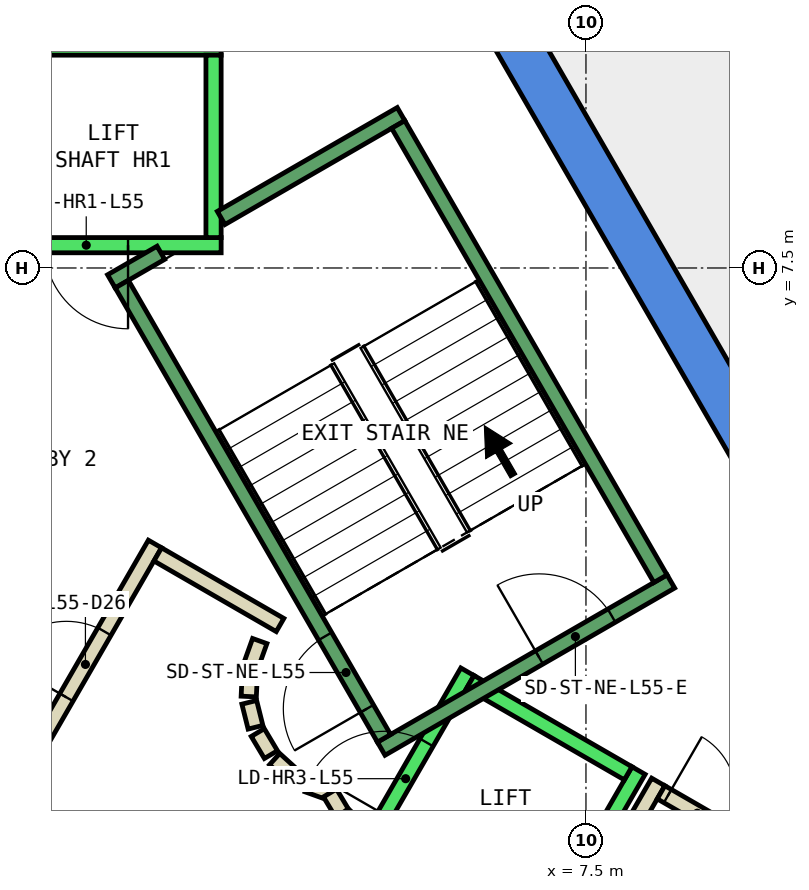
"""IFC4 building model, lengths in metres.
Left out: names, types, materials, properties, quantities, classifications, styles, units other than length and angle.
Written with IfcOpenShell. Run it as: python <this file> out.ifc"""

import sys

from ifc_helpers import new_model, si_unit, direction, frame, frame_2d, origin, place, context, subcontext, project, spatial, polyline, rectangle, outline, extrude, element, fill, save


model = new_model("IFC4")
c1 = context("Model", 3, precision=1e-05, world=origin(), true_north=direction((0.0, 1.0)))
c2 = subcontext(c1, "Body", "Model", "MODEL_VIEW")
j1 = project(units=[si_unit("LENGTHUNIT", "METRE"), si_unit("PLANEANGLEUNIT", "RADIAN")], contexts=[c1])
p1 = place(None, origin())
s1 = spatial("IfcSite", under=j1, at=p1, CompositionType="ELEMENT")
p2 = place(p1, origin())
s2 = spatial("IfcBuilding", under=s1, at=p2, CompositionType="ELEMENT")
p3 = place(p2, frame((0.0, 0.0, 245.0)))
s3 = spatial("IfcBuildingStorey", under=s2, at=p3, CompositionType="ELEMENT", Elevation=245.0)
p4 = place(p3, frame((0.0, 0.0, -0.34)))
e1 = element("IfcWall", 1, at=p4, inside=s3, PredefinedType="SHEAR", context=c2, shape_type="SweptSolid", body=[
    extrude(outline(polyline([(6.786, 10.747), (6.266, 10.447), (10.854, 2.5), (11.547, 2.5), (6.786, 10.747)])), origin(), (0.0, 0.0, 1.0), 3.6),
])
p5 = place(p3, frame((0.0, 0.0, -0.34)))
e2 = element("IfcWall", 2, at=p5, inside=s3, PredefinedType="SHEAR", context=c2, shape_type="SweptSolid", body=[
    extrude(outline(polyline([(5.774, -7.5), (11.547, 2.5), (10.854, 2.5), (5.427, -6.9), (5.774, -7.5)])), origin(), (0.0, 0.0, 1.0), 3.6),
])
p6 = place(p3, frame((8.939, 12.559, 0.0), z_axis=(0.0, 0.0, 1.0), x_axis=(0.517045022441, -0.855958202699, 0.0)))
e3 = element("IfcWall", 3, at=p6, inside=s3, PredefinedType="PARTITIONING", context=c2, shape_type="SweptSolid", body=[
    extrude(rectangle(XDim=3.166, YDim=0.2, at=frame_2d((1.583, 0.0))), origin(), (0.0, 0.0, 1.0), 3.26),
])
p7 = place(p6, frame((1.083, 0.0, 0.0)))
e4 = element("IfcOpeningElement", 4, at=p7, cuts=e3, PredefinedType="OPENING", context=c2, shape_type="SweptSolid", body=[
    extrude(rectangle(XDim=1.0, YDim=2.1, at=frame_2d((0.5, 1.05))), frame((0.0, 0.11, 0.0), z_axis=(0.0, -1.0, 0.0), x_axis=(1.0, 0.0, 0.0)), (0.0, 0.0, 1.0), 0.22),
])
p8 = place(p3, frame((5.751, -3.938, 0.0), z_axis=(0.0, 0.0, 1.0), x_axis=(0.500034260056, 0.866005622828, 0.0)))
e5 = element("IfcWall", 5, at=p8, inside=s3, PredefinedType="PARTITIONING", context=c2, shape_type="SweptSolid", body=[
    extrude(rectangle(XDim=5.399, YDim=0.2, at=frame_2d((2.7, 0.0))), origin(), (0.0, 0.0, 1.0), 3.26),
])
p9 = place(p3, frame((8.488, 0.602, 0.0), z_axis=(0.0, 0.0, 1.0), x_axis=(0.866063652425, -0.499933745558, 0.0)))
e6 = element("IfcWall", 6, at=p9, inside=s3, PredefinedType="PARTITIONING", context=c2, shape_type="SweptSolid", body=[
    extrude(rectangle(XDim=1.1, YDim=0.2, at=frame_2d((0.55, 0.0))), origin(), (0.0, 0.0, 1.0), 3.26),
])
p10 = place(p9, frame((0.1, 0.0, 0.0)))
e7 = element("IfcOpeningElement", 7, at=p10, cuts=e6, PredefinedType="OPENING", context=c2, shape_type="SweptSolid", body=[
    extrude(rectangle(XDim=0.9, YDim=2.1, at=frame_2d((0.45, 1.05))), frame((0.0, 0.11, 0.0), z_axis=(0.0, -1.0, 0.0), x_axis=(1.0, 0.0, 0.0)), (0.0, 0.0, 1.0), 0.22),
])
p11 = place(p3, frame((9.358, -4.692, 0.0), z_axis=(0.0, 0.0, 1.0), x_axis=(0.500027777314, 0.866009365951, 0.0)))
e8 = element("IfcWall", 8, at=p11, inside=s3, PredefinedType="PARTITIONING", context=c2, shape_type="SweptSolid", body=[
    extrude(rectangle(XDim=7.36, YDim=0.15, at=frame_2d((3.68, 0.0))), origin(), (0.0, 0.0, 1.0), 3.26),
])
p12 = place(p3, frame((0.05, 0.787, 0.0), z_axis=(0.0, 0.0, 1.0), x_axis=(0.499954076797, 0.866051915934, 0.0)))
e9 = element("IfcWall", 9, at=p12, inside=s3, PredefinedType="PARTITIONING", context=c2, shape_type="SweptSolid", body=[
    extrude(rectangle(XDim=3.558, YDim=0.2, at=frame_2d((1.779, 0.0))), origin(), (0.0, 0.0, 1.0), 3.26),
])
p13 = place(p12, frame((1.229, 0.0, 0.0)))
e10 = element("IfcOpeningElement", 10, at=p13, cuts=e9, PredefinedType="OPENING", context=c2, shape_type="SweptSolid", body=[
    extrude(rectangle(XDim=1.0, YDim=2.1, at=frame_2d((0.5, 1.05))), frame((0.0, 0.11, 0.0), z_axis=(0.0, -1.0, 0.0), x_axis=(1.0, 0.0, 0.0)), (0.0, 0.0, 1.0), 0.22),
])
p14 = place(p3, frame((1.866, 3.732, 0.0), z_axis=(0.0, 0.0, 1.0), x_axis=(0.866043361281, -0.499968895414, 0.0)))
e11 = element("IfcWall", 11, at=p14, inside=s3, PredefinedType="PARTITIONING", context=c2, shape_type="SweptSolid", body=[
    extrude(rectangle(XDim=1.858, YDim=0.2, at=frame_2d((0.929, 0.0))), origin(), (0.0, 0.0, 1.0), 3.26),
])
p15 = place(p3, frame((3.208, 2.592, 0.0), z_axis=(0.0, 0.0, 1.0), x_axis=(-0.337388820924, -0.941365382578, 0.0)))
e12 = element("IfcWall", 12, at=p15, inside=s3, PredefinedType="PARTITIONING", context=c2, shape_type="SweptSolid", body=[
    extrude(rectangle(XDim=0.338, YDim=0.2, at=frame_2d((0.169, 0.0))), origin(), (0.0, 0.0, 1.0), 3.26),
])
p16 = place(p3, frame((3.079, 2.199, 0.0), z_axis=(0.0, 0.0, 1.0), x_axis=(-0.047771483479, -0.998858290933, 0.0)))
e13 = element("IfcWall", 13, at=p16, inside=s3, PredefinedType="PARTITIONING", context=c2, shape_type="SweptSolid", body=[
    extrude(rectangle(XDim=0.337, YDim=0.2, at=frame_2d((0.169, 0.0))), origin(), (0.0, 0.0, 1.0), 3.26),
])
p17 = place(p3, frame((3.07, 1.786, 0.0), z_axis=(0.0, 0.0, 1.0), x_axis=(0.242705583207, -0.970099994784, 0.0)))
e14 = element("IfcWall", 14, at=p17, inside=s3, PredefinedType="PARTITIONING", context=c2, shape_type="SweptSolid", body=[
    extrude(rectangle(XDim=0.338, YDim=0.2, at=frame_2d((0.169, 0.0))), origin(), (0.0, 0.0, 1.0), 3.26),
])
for number, where, z_axis, x_axis in (
    (15, (3.182, 1.388, 0.0), (0.0, 0.0, 1.0), (0.512, -0.859, 0.0)),
    (16, (3.404, 1.039, 0.0), (0.0, 0.0, 1.0), (0.74, -0.672, 0.0)),
):
    element("IfcWall", number, at=place(p3, frame(where, z_axis=z_axis, x_axis=x_axis)), inside=s3, PredefinedType="PARTITIONING", context=c2, shape_type="SweptSolid", body=[
        extrude(rectangle(XDim=0.338, YDim=0.2, at=frame_2d((0.169, 0.0))), origin(), (0.0, 0.0, 1.0), 3.26),
    ])
p18 = place(p3, frame((3.838, 0.702, 0.0), z_axis=(0.0, 0.0, 1.0), x_axis=(0.941035081519, -0.338308993895, 0.0)))
e17 = element("IfcWall", 17, at=p18, inside=s3, PredefinedType="PARTITIONING", context=c2, shape_type="SweptSolid", body=[
    extrude(rectangle(XDim=0.337, YDim=0.2, at=frame_2d((0.168, 0.0))), origin(), (0.0, 0.0, 1.0), 3.26),
])
p19 = place(p3, frame((4.132, 0.593, 0.0), z_axis=(0.0, 0.0, 1.0), x_axis=(0.513561617048, -0.858052717201, 0.0)))
e18 = element("IfcWall", 18, at=p19, inside=s3, PredefinedType="PARTITIONING", context=c2, shape_type="SweptSolid", body=[
    extrude(rectangle(XDim=0.308, YDim=0.2, at=frame_2d((0.154, 0.0))), origin(), (0.0, 0.0, 1.0), 3.26),
])
p20 = place(p3, frame((4.301, 0.315, 0.0), z_axis=(0.0, 0.0, 1.0), x_axis=(0.741798017506, -0.670623367639, 0.0)))
e19 = element("IfcWall", 19, at=p20, inside=s3, PredefinedType="PARTITIONING", context=c2, shape_type="SweptSolid", body=[
    extrude(rectangle(XDim=0.309, YDim=0.2, at=frame_2d((0.154, 0.0))), origin(), (0.0, 0.0, 1.0), 3.26),
])
p21 = place(p3, frame((2.7, 7.8, 0.0), z_axis=(0.0, 0.0, 1.0), x_axis=(-1.0, 0.0, 0.0)))
e20 = element("IfcWall", 20, at=p21, inside=s3, PredefinedType="STANDARD", context=c2, shape_type="SweptSolid", body=[
    extrude(rectangle(XDim=5.4, YDim=0.2, at=frame_2d((2.7, 0.0))), origin(), (0.0, 0.0, 1.0), 3.26),
])
p22 = place(p21, frame((1.225, 0.0, 0.0)))
e21 = element("IfcOpeningElement", 21, at=p22, cuts=e20, PredefinedType="OPENING", context=c2, shape_type="SweptSolid", body=[
    extrude(rectangle(XDim=1.1, YDim=2.1, at=frame_2d((0.55, 1.05))), frame((0.0, 0.11, 0.0), z_axis=(0.0, -1.0, 0.0), x_axis=(1.0, 0.0, 0.0)), (0.0, 0.0, 1.0), 0.22),
])
p23 = place(p21, frame((3.075, 0.0, 0.0)))
e22 = element("IfcOpeningElement", 22, at=p23, cuts=e20, PredefinedType="OPENING", context=c2, shape_type="SweptSolid", body=[
    extrude(rectangle(XDim=1.1, YDim=2.1, at=frame_2d((0.55, 1.05))), frame((0.0, 0.11, 0.0), z_axis=(0.0, -1.0, 0.0), x_axis=(1.0, 0.0, 0.0)), (0.0, 0.0, 1.0), 0.22),
])
p24 = place(p3, frame((2.7, 10.4, 0.0), z_axis=(0.0, 0.0, 1.0), x_axis=(-1.0, 0.0, 0.0)))
e23 = element("IfcWall", 23, at=p24, inside=s3, PredefinedType="STANDARD", context=c2, shape_type="SweptSolid", body=[
    extrude(rectangle(XDim=5.4, YDim=0.2, at=frame_2d((2.7, 0.0))), origin(), (0.0, 0.0, 1.0), 3.26),
])
p25 = place(p3, frame((2.6, 7.9, 0.0), z_axis=(0.0, 0.0, 1.0), x_axis=(0.0, 1.0, 0.0)))
e24 = element("IfcWall", 24, at=p25, inside=s3, PredefinedType="STANDARD", context=c2, shape_type="SweptSolid", body=[
    extrude(rectangle(XDim=2.4, YDim=0.2, at=frame_2d((1.2, 0.0))), origin(), (0.0, 0.0, 1.0), 3.26),
])
p26 = place(p3, frame((3.24, -2.488, 0.0), z_axis=(0.0, 0.0, 1.0), x_axis=(0.500034260056, 0.866005622828, 0.0)))
e25 = element("IfcWall", 25, at=p26, inside=s3, PredefinedType="STANDARD", context=c2, shape_type="SweptSolid", body=[
    extrude(rectangle(XDim=5.399, YDim=0.2, at=frame_2d((2.7, 0.0))), origin(), (0.0, 0.0, 1.0), 3.26),
])
p27 = place(p26, frame((3.225, 0.0, 0.0)))
e26 = element("IfcOpeningElement", 26, at=p27, cuts=e25, PredefinedType="OPENING", context=c2, shape_type="SweptSolid", body=[
    extrude(rectangle(XDim=1.1, YDim=2.1, at=frame_2d((0.55, 1.05))), frame((0.0, 0.11, 0.0), z_axis=(0.0, -1.0, 0.0), x_axis=(1.0, 0.0, 0.0)), (0.0, 0.0, 1.0), 0.22),
])
p28 = place(p26, frame((1.225, 0.0, 0.0)))
e27 = element("IfcOpeningElement", 27, at=p28, cuts=e25, PredefinedType="OPENING", context=c2, shape_type="SweptSolid", body=[
    extrude(rectangle(XDim=1.1, YDim=2.1, at=frame_2d((0.55, 1.05))), frame((0.0, 0.11, 0.0), z_axis=(0.0, -1.0, 0.0), x_axis=(1.0, 0.0, 0.0)), (0.0, 0.0, 1.0), 0.22),
])
p29 = place(p3, frame((5.492, -3.788, 0.0), z_axis=(0.0, 0.0, 1.0), x_axis=(0.500034260056, 0.866005622828, 0.0)))
e28 = element("IfcWall", 28, at=p29, inside=s3, PredefinedType="STANDARD", context=c2, shape_type="SweptSolid", body=[
    extrude(rectangle(XDim=5.399, YDim=0.2, at=frame_2d((2.7, 0.0))), origin(), (0.0, 0.0, 1.0), 3.26),
])
p30 = place(p3, frame((5.977, 2.052, 0.0), z_axis=(0.0, 0.0, 1.0), x_axis=(0.865973769406, -0.500089422704, 0.0)))
e29 = element("IfcWall", 29, at=p30, inside=s3, PredefinedType="STANDARD", context=c2, shape_type="SweptSolid", body=[
    extrude(rectangle(XDim=2.399, YDim=0.2, at=frame_2d((1.2, 0.0))), origin(), (0.0, 0.0, 1.0), 3.26),
])
p31 = place(p3, frame((4.806, 1.176, 0.0), z_axis=(0.0, 0.0, 1.0), x_axis=(0.866059941101, 0.499940174841, 0.0)))
e30 = element("IfcWall", 30, at=p31, inside=s3, PredefinedType="STANDARD", context=c2, shape_type="SweptSolid", body=[
    extrude(rectangle(XDim=4.4, YDim=0.2, at=frame_2d((2.2, 0.0))), origin(), (0.0, 0.0, 1.0), 3.26),
])
p32 = place(p31, frame((2.4, 0.0, 0.0)))
e31 = element("IfcOpeningElement", 31, at=p32, cuts=e30, PredefinedType="OPENING", context=c2, shape_type="SweptSolid", body=[
    extrude(rectangle(XDim=1.1, YDim=2.2, at=frame_2d((0.55, 1.1))), frame((0.0, 0.11, 0.0), z_axis=(0.0, -1.0, 0.0), x_axis=(1.0, 0.0, 0.0)), (0.0, 0.0, 1.0), 0.22),
])
p33 = place(p3, frame((2.7, 8.158, 0.0), z_axis=(0.0, 0.0, 1.0), x_axis=(0.86611865017, 0.499838457731, 0.0)))
e32 = element("IfcWall", 32, at=p33, inside=s3, PredefinedType="STANDARD", context=c2, shape_type="SweptSolid", body=[
    extrude(rectangle(XDim=2.733, YDim=0.2, at=frame_2d((1.366, 0.0))), origin(), (0.0, 0.0, 1.0), 3.26),
])
p34 = place(p3, frame((1.256, 7.324, 0.0), z_axis=(0.0, 0.0, 1.0), x_axis=(0.865915093549, 0.500191014278, 0.0)))
e33 = element("IfcWall", 33, at=p34, inside=s3, PredefinedType="STANDARD", context=c2, shape_type="SweptSolid", body=[
    extrude(rectangle(XDim=0.752, YDim=0.2, at=frame_2d((0.376, 0.0))), origin(), (0.0, 0.0, 1.0), 3.26),
])
p35 = place(p3, frame((4.843, 1.312, 0.0), z_axis=(0.0, 0.0, 1.0), x_axis=(-0.499963383562, 0.866046543262, 0.0)))
e34 = element("IfcWall", 34, at=p35, inside=s3, PredefinedType="STANDARD", context=c2, shape_type="SweptSolid", body=[
    extrude(rectangle(XDim=6.9, YDim=0.2, at=frame_2d((3.45, 0.0))), origin(), (0.0, 0.0, 1.0), 3.26),
])
p36 = place(p35, frame((0.45, 0.0, 0.0)))
e35 = element("IfcOpeningElement", 35, at=p36, cuts=e34, PredefinedType="OPENING", context=c2, shape_type="SweptSolid", body=[
    extrude(rectangle(XDim=1.1, YDim=2.2, at=frame_2d((0.55, 1.1))), frame((0.0, 0.11, 0.0), z_axis=(0.0, -1.0, 0.0), x_axis=(1.0, 0.0, 0.0)), (0.0, 0.0, 1.0), 0.22),
])
p37 = place(p3, frame((8.48, 3.412, 0.0), z_axis=(0.0, 0.0, 1.0), x_axis=(-0.499978703459, 0.866037698999, 0.0)))
e36 = element("IfcWall", 36, at=p37, inside=s3, PredefinedType="STANDARD", context=c2, shape_type="SweptSolid", body=[
    extrude(rectangle(XDim=6.9, YDim=0.2, at=frame_2d((3.45, 0.0))), origin(), (0.0, 0.0, 1.0), 3.26),
])
p38 = place(p13, origin())
e37 = element("IfcDoor", 37, at=p38, inside=s3, OperationType="SINGLE_SWING_RIGHT", PredefinedType="DOOR", context=c2, shape_type="SweptSolid", body=[
    extrude(rectangle(XDim=1.0, YDim=2.1, at=frame_2d((0.5, 1.05))), frame((0.0, 0.025, 0.0), z_axis=(0.0, -1.0, 0.0), x_axis=(1.0, 0.0, 0.0)), (0.0, 0.0, 1.0), 0.05),
])
fill(e10, e37)
p39 = place(p10, origin())
e38 = element("IfcDoor", 38, at=p39, inside=s3, OperationType="SINGLE_SWING_RIGHT", PredefinedType="DOOR", context=c2, shape_type="SweptSolid", body=[
    extrude(rectangle(XDim=0.9, YDim=2.1, at=frame_2d((0.45, 1.05))), frame((0.0, 0.025, 0.0), z_axis=(0.0, -1.0, 0.0), x_axis=(1.0, 0.0, 0.0)), (0.0, 0.0, 1.0), 0.05),
])
fill(e7, e38)
p40 = place(p22, origin())
e39 = element("IfcDoor", 39, at=p40, inside=s3, OperationType="SLIDING_TO_LEFT", PredefinedType="DOOR", context=c2, shape_type="SweptSolid", body=[
    extrude(rectangle(XDim=1.1, YDim=2.1, at=frame_2d((0.55, 1.05))), frame((0.0, 0.025, 0.0), z_axis=(0.0, -1.0, 0.0), x_axis=(1.0, 0.0, 0.0)), (0.0, 0.0, 1.0), 0.05),
])
fill(e21, e39)
p41 = place(p27, origin())
e40 = element("IfcDoor", 40, at=p41, inside=s3, OperationType="SLIDING_TO_LEFT", PredefinedType="DOOR", context=c2, shape_type="SweptSolid", body=[
    extrude(rectangle(XDim=1.1, YDim=2.1, at=frame_2d((0.55, 1.05))), frame((0.0, 0.025, 0.0), z_axis=(0.0, -1.0, 0.0), x_axis=(1.0, 0.0, 0.0)), (0.0, 0.0, 1.0), 0.05),
])
fill(e26, e40)
p42 = place(p36, origin())
e41 = element("IfcDoor", 41, at=p42, inside=s3, OperationType="SINGLE_SWING_LEFT", PredefinedType="DOOR", context=c2, shape_type="SweptSolid", body=[
    extrude(rectangle(XDim=1.1, YDim=2.2, at=frame_2d((0.55, 1.1))), frame((0.0, 0.025, 0.0), z_axis=(0.0, -1.0, 0.0), x_axis=(1.0, 0.0, 0.0)), (0.0, 0.0, 1.0), 0.05),
])
fill(e35, e41)
p43 = place(p32, origin())
e42 = element("IfcDoor", 42, at=p43, inside=s3, OperationType="SINGLE_SWING_LEFT", PredefinedType="DOOR", context=c2, shape_type="SweptSolid", body=[
    extrude(rectangle(XDim=1.1, YDim=2.2, at=frame_2d((0.55, 1.1))), frame((0.0, 0.025, 0.0), z_axis=(0.0, -1.0, 0.0), x_axis=(1.0, 0.0, 0.0)), (0.0, 0.0, 1.0), 0.05),
])
fill(e31, e42)
save(model, sys.argv[1])
